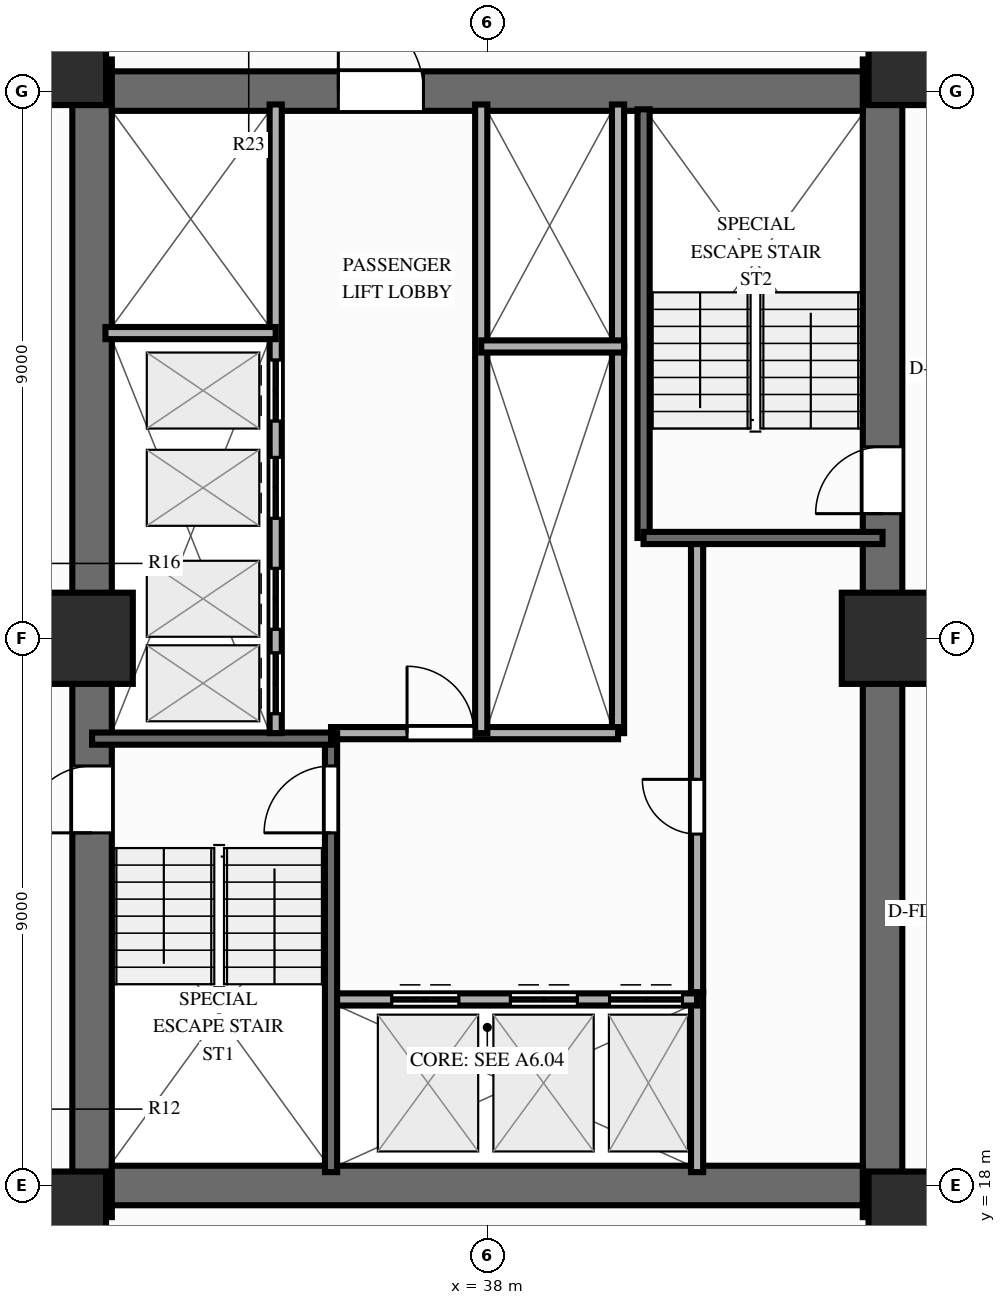
"""IFC4 building model, lengths in metres.
Left out: names, types, materials, properties, quantities, classifications, styles, units other than length and angle.
Written with IfcOpenShell. Run it as: python <this file> out.ifc"""

import sys

from ifc_helpers import new_model, si_unit, direction, frame, frame_2d, origin, origin_2d, place, context, subcontext, project, spatial, rectangle, extrude, source, transform, mapped, element, fill, save


model = new_model("IFC4")
c1 = context("Model", 3, precision=1e-05, world=origin(), true_north=direction((0.0, 1.0)))
c2 = subcontext(c1, "Body", "Model", "MODEL_VIEW")
j1 = project(units=[si_unit("LENGTHUNIT", "METRE"), si_unit("PLANEANGLEUNIT", "RADIAN")], contexts=[c1])
p1 = place(None, origin())
s1 = spatial("IfcSite", under=j1, at=p1, CompositionType="ELEMENT")
p2 = place(p1, origin())
s2 = spatial("IfcBuilding", under=s1, at=p2, CompositionType="ELEMENT")
p3 = place(p2, frame((0.0, 0.0, 52.4)))
s3 = spatial("IfcBuildingStorey", under=s2, at=p3, CompositionType="ELEMENT", Elevation=52.4)
p4 = place(p3, frame((31.5, 17.48, 0.0), z_axis=(0.0, 0.0, 1.0), x_axis=(0.0, 1.0, 0.0)))
e1 = element("IfcWall", 1, at=p4, inside=s3, PredefinedType="SHEAR", context=c2, shape_type="SweptSolid", body=[
    extrude(rectangle(XDim=19.04, YDim=0.65, at=frame_2d((9.52, 0.0))), origin(), (0.0, 0.0, 1.0), 3.0),
])
p5 = place(p4, frame((6.32, 0.0, 0.0)))
e2 = element("IfcOpeningElement", 2, at=p5, cuts=e1, PredefinedType="OPENING", context=c2, shape_type="SweptSolid", body=[
    extrude(rectangle(XDim=1.1, YDim=2.15, at=frame_2d((0.55, 1.075))), frame((0.0, 0.337, 0.0), z_axis=(0.0, -1.0, 0.0), x_axis=(1.0, 0.0, 0.0)), (0.0, 0.0, 1.0), 0.674),
])
p6 = place(p3, frame((44.5, 17.48, 0.0), z_axis=(0.0, 0.0, 1.0), x_axis=(0.0, 1.0, 0.0)))
e3 = element("IfcWall", 3, at=p6, inside=s3, PredefinedType="SHEAR", context=c2, shape_type="SweptSolid", body=[
    extrude(rectangle(XDim=19.04, YDim=0.65, at=frame_2d((9.52, 0.0))), origin(), (0.0, 0.0, 1.0), 3.0),
])
p7 = place(p6, frame((12.67, 0.0, 0.0), z_axis=(0.0, 0.0, 1.0), x_axis=(-1.0, 0.0, 0.0)))
e4 = element("IfcOpeningElement", 4, at=p7, cuts=e3, PredefinedType="OPENING", context=c2, shape_type="SweptSolid", body=[
    extrude(rectangle(XDim=1.1, YDim=2.15, at=frame_2d((0.55, 1.075))), frame((0.0, 0.337, 0.0), z_axis=(0.0, -1.0, 0.0), x_axis=(1.0, 0.0, 0.0)), (0.0, 0.0, 1.0), 0.674),
])
p8 = place(p3, frame((31.825, 18.0, 0.0), z_axis=(0.0, 0.0, 1.0), x_axis=(1.0, 0.0, 0.0)))
e5 = element("IfcWall", 5, at=p8, inside=s3, PredefinedType="SHEAR", context=c2, shape_type="SweptSolid", body=[
    extrude(rectangle(XDim=12.35, YDim=0.65, at=frame_2d((6.175, 0.0))), origin(), (0.0, 0.0, 1.0), 3.0),
])
p9 = place(p3, frame((31.825, 36.0, 0.0), z_axis=(0.0, 0.0, 1.0), x_axis=(1.0, 0.0, 0.0)))
e6 = element("IfcWall", 6, at=p9, inside=s3, PredefinedType="SHEAR", context=c2, shape_type="SweptSolid", body=[
    extrude(rectangle(XDim=12.35, YDim=0.65, at=frame_2d((6.175, 0.0))), origin(), (0.0, 0.0, 1.0), 3.0),
])
p10 = place(p9, frame((5.125, 0.0, 0.0), z_axis=(0.0, 0.0, 1.0), x_axis=(-1.0, 0.0, 0.0)))
e7 = element("IfcOpeningElement", 7, at=p10, cuts=e6, PredefinedType="OPENING", context=c2, shape_type="SweptSolid", body=[
    extrude(rectangle(XDim=1.4, YDim=2.15, at=frame_2d((0.7, 1.075))), frame((0.0, 0.337, 0.0), z_axis=(0.0, -1.0, 0.0), x_axis=(1.0, 0.0, 0.0)), (0.0, 0.0, 1.0), 0.674),
])
m1 = source(origin(), c2, "Body", "SweptSolid", [
    extrude(rectangle(XDim=1.5, YDim=1.5, at=origin_2d()), origin(), (0.0, 0.0, 1.0), 3.0),
])
for number, where, z_axis, x_axis in (
    (8, (30.98, 17.48, 0.0), (0.0, 0.0, 1.0), (1.0, 0.0, 0.0)),
    (9, (45.02, 17.48, 0.0), (0.0, 0.0, 1.0), (1.0, 0.0, 0.0)),
    (10, (30.98, 36.52, 0.0), (0.0, 0.0, 1.0), (1.0, 0.0, 0.0)),
    (11, (45.02, 36.52, 0.0), (0.0, 0.0, 1.0), (1.0, 0.0, 0.0)),
    (12, (31.42, 27.0, 0.0), (0.0, 0.0, 1.0), (1.0, 0.0, 0.0)),
    (13, (44.58, 27.0, 0.0), (0.0, 0.0, 1.0), (1.0, 0.0, 0.0)),
):
    element("IfcColumn", number, at=place(p3, frame(where, z_axis=z_axis, x_axis=x_axis)), inside=s3, PredefinedType="COLUMN", context=c2, shape_type="MappedRepresentation", body=[
        mapped(m1, transform((0.0, 0.0, 0.0), scale=1.0)),
    ])
p11 = place(p3, frame((41.45, 18.22, 0.0), z_axis=(0.0, 0.0, 1.0), x_axis=(0.0, 1.0, 0.0)))
e14 = element("IfcWall", 14, at=p11, inside=s3, PredefinedType="PARTITIONING", context=c2, shape_type="SweptSolid", body=[
    extrude(rectangle(XDim=2.96, YDim=0.2, at=frame_2d((1.48, 0.0))), origin(), (0.0, 0.0, 1.0), 2.79),
])
p12 = place(p3, frame((41.45, 21.18, 0.0), z_axis=(0.0, 0.0, 1.0), x_axis=(0.0, 1.0, 0.0)))
e15 = element("IfcWall", 15, at=p12, inside=s3, PredefinedType="PARTITIONING", context=c2, shape_type="SweptSolid", body=[
    extrude(rectangle(XDim=7.42, YDim=0.2, at=frame_2d((3.71, 0.0))), origin(), (0.0, 0.0, 1.0), 2.79),
])
p13 = place(p12, frame((2.6, 0.0, 0.0)))
e16 = element("IfcOpeningElement", 16, at=p13, cuts=e15, PredefinedType="OPENING", context=c2, shape_type="SweptSolid", body=[
    extrude(rectangle(XDim=0.9, YDim=2.1, at=frame_2d((0.45, 1.05))), frame((0.0, 0.112, 0.0), z_axis=(0.0, -1.0, 0.0), x_axis=(1.0, 0.0, 0.0)), (0.0, 0.0, 1.0), 0.224),
])
p14 = place(p3, frame((40.15, 25.44, 0.0), z_axis=(0.0, 0.0, 1.0), x_axis=(0.0, 1.0, 0.0)))
e17 = element("IfcWall", 17, at=p14, inside=s3, PredefinedType="PARTITIONING", context=c2, shape_type="SweptSolid", body=[
    extrude(rectangle(XDim=6.36, YDim=0.2, at=frame_2d((3.18, 0.0))), origin(), (0.0, 0.0, 1.0), 2.79),
])
p15 = place(p3, frame((40.15, 31.8, 0.0), z_axis=(0.0, 0.0, 1.0), x_axis=(0.0, 1.0, 0.0)))
e18 = element("IfcWall", 18, at=p15, inside=s3, PredefinedType="PARTITIONING", context=c2, shape_type="SweptSolid", body=[
    extrude(rectangle(XDim=3.98, YDim=0.2, at=frame_2d((1.99, 0.0))), origin(), (0.0, 0.0, 1.0), 2.79),
])
p16 = place(p3, frame((35.43, 21.06, 0.0), z_axis=(0.0, 0.0, 1.0), x_axis=(1.0, 0.0, 0.0)))
e19 = element("IfcWall", 19, at=p16, inside=s3, PredefinedType="PARTITIONING", context=c2, shape_type="SweptSolid", body=[
    extrude(rectangle(XDim=6.02, YDim=0.2, at=frame_2d((3.01, 0.0))), origin(), (0.0, 0.0, 1.0), 2.79),
])
p17 = place(p16, frame((1.0, 0.0, 0.0)))
e20 = element("IfcOpeningElement", 20, at=p17, cuts=e19, PredefinedType="OPENING", context=c2, shape_type="SweptSolid", body=[
    extrude(rectangle(XDim=1.1, YDim=2.15, at=frame_2d((0.55, 1.075))), frame((0.0, 0.112, 0.0), z_axis=(0.0, -1.0, 0.0), x_axis=(1.0, 0.0, 0.0)), (0.0, 0.0, 1.0), 0.224),
])
p18 = place(p16, frame((2.95, 0.0, 0.0)))
e21 = element("IfcOpeningElement", 21, at=p18, cuts=e19, PredefinedType="OPENING", context=c2, shape_type="SweptSolid", body=[
    extrude(rectangle(XDim=1.1, YDim=2.15, at=frame_2d((0.55, 1.075))), frame((0.0, 0.112, 0.0), z_axis=(0.0, -1.0, 0.0), x_axis=(1.0, 0.0, 0.0)), (0.0, 0.0, 1.0), 0.224),
])
p19 = place(p16, frame((4.58, 0.0, 0.0)))
e22 = element("IfcOpeningElement", 22, at=p19, cuts=e19, PredefinedType="OPENING", context=c2, shape_type="SweptSolid", body=[
    extrude(rectangle(XDim=1.2, YDim=2.15, at=frame_2d((0.6, 1.075))), frame((0.0, 0.112, 0.0), z_axis=(0.0, -1.0, 0.0), x_axis=(1.0, 0.0, 0.0)), (0.0, 0.0, 1.0), 0.224),
])
p20 = place(p3, frame((35.43, 25.44, 0.0), z_axis=(0.0, 0.0, 1.0), x_axis=(1.0, 0.0, 0.0)))
e23 = element("IfcWall", 23, at=p20, inside=s3, PredefinedType="PARTITIONING", context=c2, shape_type="SweptSolid", body=[
    extrude(rectangle(XDim=4.72, YDim=0.2, at=frame_2d((2.36, 0.0))), origin(), (0.0, 0.0, 1.0), 2.79),
])
p21 = place(p20, frame((1.25, 0.0, 0.0)))
e24 = element("IfcOpeningElement", 24, at=p21, cuts=e23, PredefinedType="OPENING", context=c2, shape_type="SweptSolid", body=[
    extrude(rectangle(XDim=1.1, YDim=2.15, at=frame_2d((0.55, 1.075))), frame((0.0, 0.112, 0.0), z_axis=(0.0, -1.0, 0.0), x_axis=(1.0, 0.0, 0.0)), (0.0, 0.0, 1.0), 0.224),
])
p22 = place(p3, frame((35.43, 18.22, 0.0), z_axis=(0.0, 0.0, 1.0), x_axis=(0.0, 1.0, 0.0)))
e25 = element("IfcWall", 25, at=p22, inside=s3, PredefinedType="SOLIDWALL", context=c2, shape_type="SweptSolid", body=[
    extrude(rectangle(XDim=7.22, YDim=0.2, at=frame_2d((3.61, 0.0))), origin(), (0.0, 0.0, 1.0), 2.79),
])
p23 = place(p22, frame((6.68, 0.0, 0.0), z_axis=(0.0, 0.0, 1.0), x_axis=(-1.0, 0.0, 0.0)))
e26 = element("IfcOpeningElement", 26, at=p23, cuts=e25, PredefinedType="OPENING", context=c2, shape_type="SweptSolid", body=[
    extrude(rectangle(XDim=1.1, YDim=2.15, at=frame_2d((0.55, 1.075))), frame((0.0, 0.112, 0.0), z_axis=(0.0, -1.0, 0.0), x_axis=(1.0, 0.0, 0.0)), (0.0, 0.0, 1.0), 0.224),
])
p24 = place(p3, frame((31.5, 25.35, 0.0), z_axis=(0.0, 0.0, 1.0), x_axis=(1.0, 0.0, 0.0)))
e27 = element("IfcWall", 27, at=p24, inside=s3, PredefinedType="SOLIDWALL", context=c2, shape_type="SweptSolid", body=[
    extrude(rectangle(XDim=3.93, YDim=0.2, at=frame_2d((1.965, 0.0))), origin(), (0.0, 0.0, 1.0), 2.79),
])
p25 = place(p3, frame((40.57, 28.65, 0.0), z_axis=(0.0, 0.0, 1.0), x_axis=(0.0, 1.0, 0.0)))
e28 = element("IfcWall", 28, at=p25, inside=s3, PredefinedType="SOLIDWALL", context=c2, shape_type="SweptSolid", body=[
    extrude(rectangle(XDim=7.05, YDim=0.2, at=frame_2d((3.525, 0.0))), origin(), (0.0, 0.0, 1.0), 2.79),
])
p26 = place(p3, frame((40.57, 28.65, 0.0), z_axis=(0.0, 0.0, 1.0), x_axis=(1.0, 0.0, 0.0)))
e29 = element("IfcWall", 29, at=p26, inside=s3, PredefinedType="SOLIDWALL", context=c2, shape_type="SweptSolid", body=[
    extrude(rectangle(XDim=3.93, YDim=0.2, at=frame_2d((1.965, 0.0))), origin(), (0.0, 0.0, 1.0), 2.79),
])
p27 = place(p3, frame((34.52, 25.44, 0.0), z_axis=(0.0, 0.0, 1.0), x_axis=(0.0, 1.0, 0.0)))
e30 = element("IfcWall", 30, at=p27, inside=s3, PredefinedType="PARTITIONING", context=c2, shape_type="SweptSolid", body=[
    extrude(rectangle(XDim=10.34, YDim=0.2, at=frame_2d((5.17, 0.0))), origin(), (0.0, 0.0, 1.0), 2.79),
])
p28 = place(p27, frame((0.32, 0.0, 0.0)))
e31 = element("IfcOpeningElement", 31, at=p28, cuts=e30, PredefinedType="OPENING", context=c2, shape_type="SweptSolid", body=[
    extrude(rectangle(XDim=1.0, YDim=2.15, at=frame_2d((0.5, 1.075))), frame((0.0, 0.112, 0.0), z_axis=(0.0, -1.0, 0.0), x_axis=(1.0, 0.0, 0.0)), (0.0, 0.0, 1.0), 0.224),
])
p29 = place(p27, frame((1.71, 0.0, 0.0)))
e32 = element("IfcOpeningElement", 32, at=p29, cuts=e30, PredefinedType="OPENING", context=c2, shape_type="SweptSolid", body=[
    extrude(rectangle(XDim=1.0, YDim=2.15, at=frame_2d((0.5, 1.075))), frame((0.0, 0.112, 0.0), z_axis=(0.0, -1.0, 0.0), x_axis=(1.0, 0.0, 0.0)), (0.0, 0.0, 1.0), 0.224),
])
p30 = place(p27, frame((3.535, 0.0, 0.0)))
e33 = element("IfcOpeningElement", 33, at=p30, cuts=e30, PredefinedType="OPENING", context=c2, shape_type="SweptSolid", body=[
    extrude(rectangle(XDim=1.0, YDim=2.15, at=frame_2d((0.5, 1.075))), frame((0.0, 0.112, 0.0), z_axis=(0.0, -1.0, 0.0), x_axis=(1.0, 0.0, 0.0)), (0.0, 0.0, 1.0), 0.224),
])
p31 = place(p27, frame((5.135, 0.0, 0.0)))
e34 = element("IfcOpeningElement", 34, at=p31, cuts=e30, PredefinedType="OPENING", context=c2, shape_type="SweptSolid", body=[
    extrude(rectangle(XDim=1.0, YDim=2.15, at=frame_2d((0.5, 1.075))), frame((0.0, 0.112, 0.0), z_axis=(0.0, -1.0, 0.0), x_axis=(1.0, 0.0, 0.0)), (0.0, 0.0, 1.0), 0.224),
])
p32 = place(p3, frame((31.72, 32.02, 0.0), z_axis=(0.0, 0.0, 1.0), x_axis=(1.0, 0.0, 0.0)))
e35 = element("IfcWall", 35, at=p32, inside=s3, PredefinedType="PARTITIONING", context=c2, shape_type="SweptSolid", body=[
    extrude(rectangle(XDim=2.8, YDim=0.2, at=frame_2d((1.4, 0.0))), origin(), (0.0, 0.0, 1.0), 2.79),
])
p33 = place(p3, frame((37.9, 25.44, 0.0), z_axis=(0.0, 0.0, 1.0), x_axis=(0.0, 1.0, 0.0)))
e36 = element("IfcWall", 36, at=p33, inside=s3, PredefinedType="PARTITIONING", context=c2, shape_type="SweptSolid", body=[
    extrude(rectangle(XDim=10.34, YDim=0.2, at=frame_2d((5.17, 0.0))), origin(), (0.0, 0.0, 1.0), 2.79),
])
p34 = place(p3, frame((37.9, 31.8, 0.0), z_axis=(0.0, 0.0, 1.0), x_axis=(1.0, 0.0, 0.0)))
e37 = element("IfcWall", 37, at=p34, inside=s3, PredefinedType="PARTITIONING", context=c2, shape_type="SweptSolid", body=[
    extrude(rectangle(XDim=2.35, YDim=0.2, at=frame_2d((1.175, 0.0))), origin(), (0.0, 0.0, 1.0), 2.79),
])
m2 = source(origin(), c2, "Body", "SweptSolid", [
    extrude(rectangle(XDim=1.1, YDim=2.15, at=frame_2d((0.55, 1.075))), frame((0.0, 0.025, 0.0), z_axis=(0.0, -1.0, 0.0), x_axis=(1.0, 0.0, 0.0)), (0.0, 0.0, 1.0), 0.05),
])
p35 = place(p5, origin())
e38 = element("IfcDoor", 38, at=p35, inside=s3, OperationType="SINGLE_SWING_LEFT", PredefinedType="DOOR", context=c2, shape_type="MappedRepresentation", body=[
    mapped(m2, transform((0.0, 0.0, 0.0), scale=1.0)),
])
fill(e2, e38)
p36 = place(p7, origin())
e39 = element("IfcDoor", 39, at=p36, inside=s3, OperationType="SINGLE_SWING_RIGHT", PredefinedType="DOOR", context=c2, shape_type="MappedRepresentation", body=[
    mapped(m2, transform((0.0, 0.0, 0.0), scale=1.0)),
])
fill(e4, e39)
m3 = source(origin(), c2, "Body", "SweptSolid", [
    extrude(rectangle(XDim=1.4, YDim=2.15, at=frame_2d((0.7, 1.075))), frame((0.0, 0.025, 0.0), z_axis=(0.0, -1.0, 0.0), x_axis=(1.0, 0.0, 0.0)), (0.0, 0.0, 1.0), 0.05),
])
p37 = place(p10, origin())
e40 = element("IfcDoor", 40, at=p37, inside=s3, OperationType="SINGLE_SWING_RIGHT", PredefinedType="DOOR", context=c2, shape_type="MappedRepresentation", body=[
    mapped(m3, transform((0.0, 0.0, 0.0), scale=1.0)),
])
fill(e7, e40)
m4 = source(origin(), c2, "Body", "SweptSolid", [
    extrude(rectangle(XDim=0.9, YDim=2.1, at=frame_2d((0.45, 1.05))), frame((0.0, 0.025, 0.0), z_axis=(0.0, -1.0, 0.0), x_axis=(1.0, 0.0, 0.0)), (0.0, 0.0, 1.0), 0.05),
])
p38 = place(p13, origin())
e41 = element("IfcDoor", 41, at=p38, inside=s3, OperationType="SINGLE_SWING_RIGHT", PredefinedType="DOOR", context=c2, shape_type="MappedRepresentation", body=[
    mapped(m4, transform((0.0, 0.0, 0.0), scale=1.0)),
])
fill(e16, e41)
p39 = place(p17, origin())
e42 = element("IfcDoor", 42, at=p39, inside=s3, OperationType="DOUBLE_DOOR_SLIDING", PredefinedType="DOOR", context=c2, shape_type="MappedRepresentation", body=[
    mapped(m2, transform((0.0, 0.0, 0.0), scale=1.0)),
])
fill(e20, e42)
p40 = place(p18, origin())
e43 = element("IfcDoor", 43, at=p40, inside=s3, OperationType="DOUBLE_DOOR_SLIDING", PredefinedType="DOOR", context=c2, shape_type="MappedRepresentation", body=[
    mapped(m2, transform((0.0, 0.0, 0.0), scale=1.0)),
])
fill(e21, e43)
m5 = source(origin(), c2, "Body", "SweptSolid", [
    extrude(rectangle(XDim=1.2, YDim=2.15, at=frame_2d((0.6, 1.075))), frame((0.0, 0.025, 0.0), z_axis=(0.0, -1.0, 0.0), x_axis=(1.0, 0.0, 0.0)), (0.0, 0.0, 1.0), 0.05),
])
p41 = place(p19, origin())
e44 = element("IfcDoor", 44, at=p41, inside=s3, OperationType="DOUBLE_DOOR_SLIDING", PredefinedType="DOOR", context=c2, shape_type="MappedRepresentation", body=[
    mapped(m5, transform((0.0, 0.0, 0.0), scale=1.0)),
])
fill(e22, e44)
p42 = place(p21, origin())
e45 = element("IfcDoor", 45, at=p42, inside=s3, OperationType="SINGLE_SWING_LEFT", PredefinedType="DOOR", context=c2, shape_type="MappedRepresentation", body=[
    mapped(m2, transform((0.0, 0.0, 0.0), scale=1.0)),
])
fill(e24, e45)
p43 = place(p23, origin())
e46 = element("IfcDoor", 46, at=p43, inside=s3, OperationType="SINGLE_SWING_RIGHT", PredefinedType="DOOR", context=c2, shape_type="MappedRepresentation", body=[
    mapped(m2, transform((0.0, 0.0, 0.0), scale=1.0)),
])
fill(e26, e46)
m6 = source(origin(), c2, "Body", "SweptSolid", [
    extrude(rectangle(XDim=1.0, YDim=2.15, at=frame_2d((0.5, 1.075))), frame((0.0, 0.025, 0.0), z_axis=(0.0, -1.0, 0.0), x_axis=(1.0, 0.0, 0.0)), (0.0, 0.0, 1.0), 0.05),
])
p44 = place(p28, origin())
e47 = element("IfcDoor", 47, at=p44, inside=s3, OperationType="DOUBLE_DOOR_SLIDING", PredefinedType="DOOR", context=c2, shape_type="MappedRepresentation", body=[
    mapped(m6, transform((0.0, 0.0, 0.0), scale=1.0)),
])
fill(e31, e47)
p45 = place(p29, origin())
e48 = element("IfcDoor", 48, at=p45, inside=s3, OperationType="DOUBLE_DOOR_SLIDING", PredefinedType="DOOR", context=c2, shape_type="MappedRepresentation", body=[
    mapped(m6, transform((0.0, 0.0, 0.0), scale=1.0)),
])
fill(e32, e48)
p46 = place(p30, origin())
e49 = element("IfcDoor", 49, at=p46, inside=s3, OperationType="DOUBLE_DOOR_SLIDING", PredefinedType="DOOR", context=c2, shape_type="MappedRepresentation", body=[
    mapped(m6, transform((0.0, 0.0, 0.0), scale=1.0)),
])
fill(e33, e49)
p47 = place(p31, origin())
e50 = element("IfcDoor", 50, at=p47, inside=s3, OperationType="DOUBLE_DOOR_SLIDING", PredefinedType="DOOR", context=c2, shape_type="MappedRepresentation", body=[
    mapped(m6, transform((0.0, 0.0, 0.0), scale=1.0)),
])
fill(e34, e50)
save(model, sys.argv[1])
